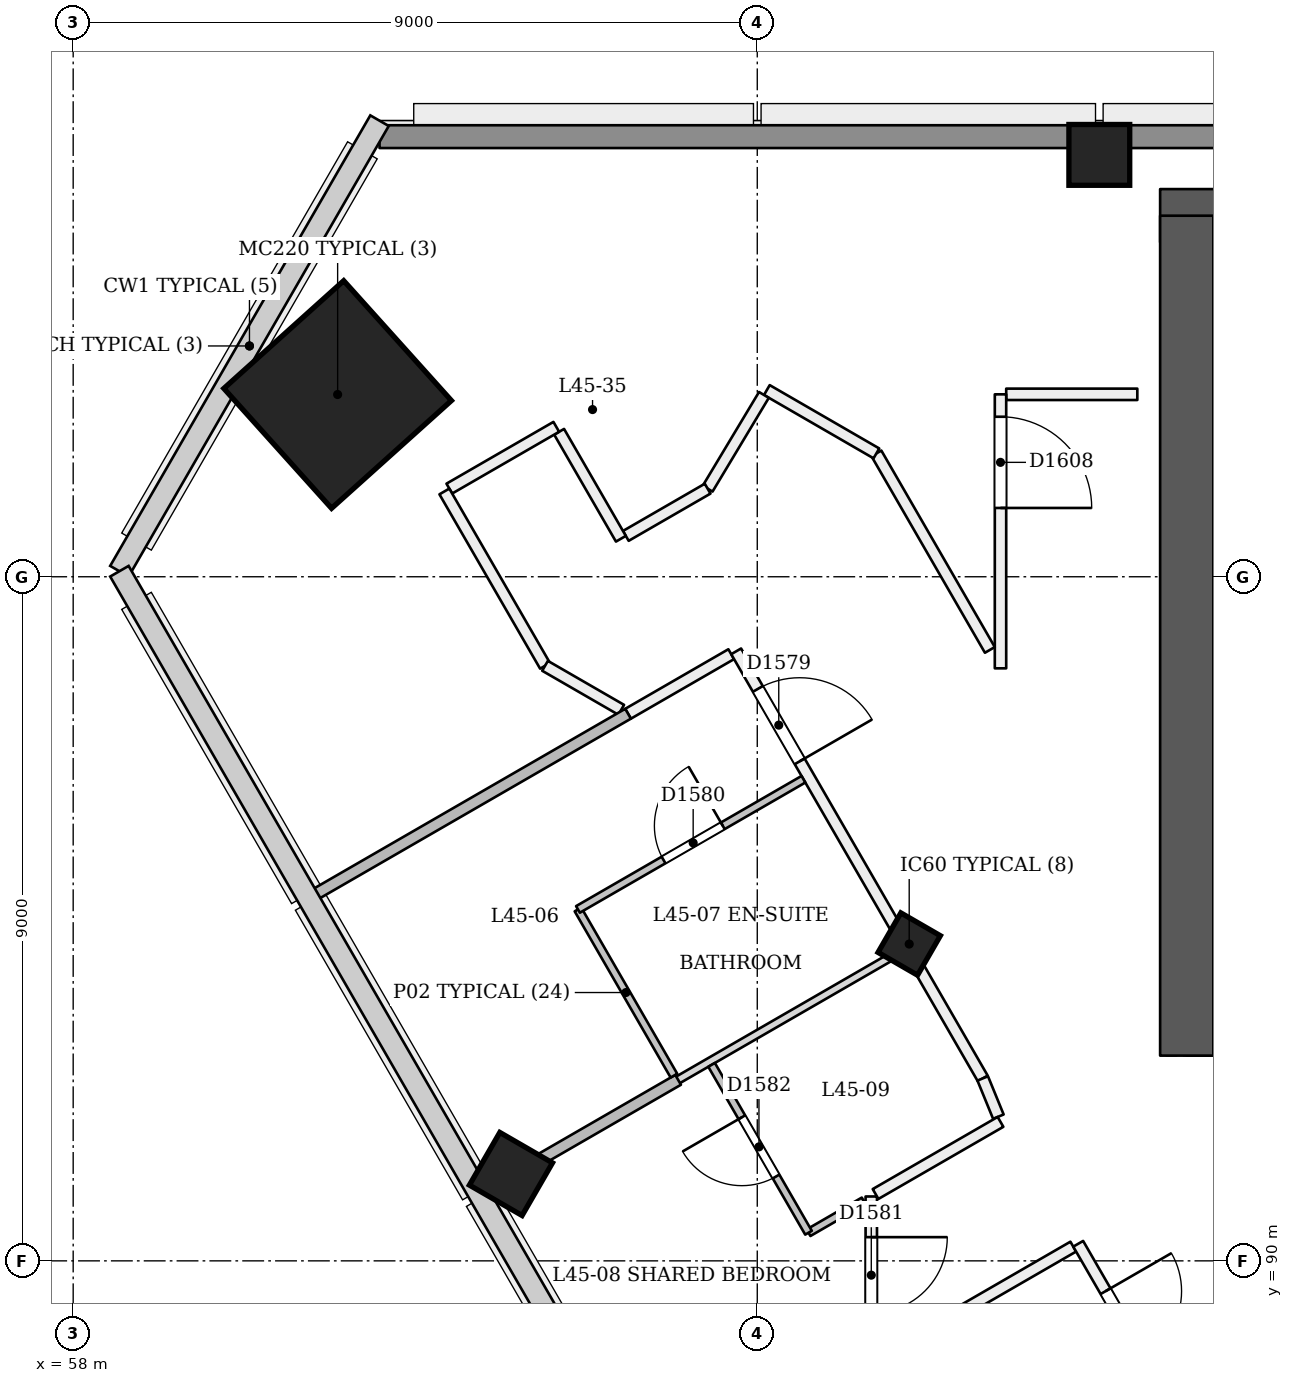
"""IFC4 building model, lengths in metres.
Left out: names, types, materials, properties, quantities, classifications, styles, units other than length and angle.
Written with IfcOpenShell. Run it as: python <this file> out.ifc"""

import sys

from ifc_helpers import new_model, si_unit, direction, frame, frame_2d, origin, origin_2d, place, context, subcontext, project, spatial, rectangle, extrude, element, fill, save


model = new_model("IFC4")
c1 = context("Model", 3, precision=1e-05, world=origin(), true_north=direction((0.0, 1.0)))
c2 = subcontext(c1, "Body", "Model", "MODEL_VIEW")
j1 = project(units=[si_unit("LENGTHUNIT", "METRE"), si_unit("PLANEANGLEUNIT", "RADIAN")], contexts=[c1])
p1 = place(None, origin())
s1 = spatial("IfcSite", under=j1, at=p1, CompositionType="ELEMENT")
p2 = place(p1, origin())
s2 = spatial("IfcBuilding", under=s1, at=p2, CompositionType="ELEMENT")
p3 = place(p2, frame((0.0, 0.0, 174.6)))
s3 = spatial("IfcBuildingStorey", under=s2, at=p3, CompositionType="ELEMENT", Elevation=174.6)
p4 = place(p3, frame((72.65, 93.05, 0.0), z_axis=(0.0, 0.0, 1.0), x_axis=(1.0, 0.0, 0.0)))
e1 = element("IfcWall", 1, at=p4, inside=s3, PredefinedType="SHEAR", context=c2, shape_type="SweptSolid", body=[
    extrude(rectangle(XDim=25.05, YDim=0.7, at=frame_2d((12.525, 0.0))), origin(), (0.0, 0.0, 1.0), 3.6),
])
p5 = place(p4, frame((1.15, 0.0, 0.0)))
e2 = element("IfcOpeningElement", 2, at=p5, cuts=e1, PredefinedType="OPENING", context=c2, shape_type="SweptSolid", body=[
    extrude(rectangle(XDim=1.2, YDim=2.1, at=frame_2d((0.6, 1.05))), frame((0.0, 0.36, 0.0), z_axis=(0.0, -1.0, 0.0), x_axis=(1.0, 0.0, 0.0)), (0.0, 0.0, 1.0), 0.721),
])
p6 = place(p4, frame((3.35, 0.0, 0.0)))
e3 = element("IfcOpeningElement", 3, at=p6, cuts=e1, PredefinedType="OPENING", context=c2, shape_type="SweptSolid", body=[
    extrude(rectangle(XDim=1.2, YDim=2.1, at=frame_2d((0.6, 1.05))), frame((0.0, 0.36, 0.0), z_axis=(0.0, -1.0, 0.0), x_axis=(1.0, 0.0, 0.0)), (0.0, 0.0, 1.0), 0.721),
])
p7 = place(p4, frame((13.35, 0.0, 0.0)))
e4 = element("IfcOpeningElement", 4, at=p7, cuts=e1, PredefinedType="OPENING", context=c2, shape_type="SweptSolid", body=[
    extrude(rectangle(XDim=1.2, YDim=2.1, at=frame_2d((0.6, 1.05))), frame((0.0, 0.36, 0.0), z_axis=(0.0, -1.0, 0.0), x_axis=(1.0, 0.0, 0.0)), (0.0, 0.0, 1.0), 0.721),
])
p8 = place(p4, frame((15.312, 0.0, 0.0)))
e5 = element("IfcOpeningElement", 5, at=p8, cuts=e1, PredefinedType="OPENING", context=c2, shape_type="SweptSolid", body=[
    extrude(rectangle(XDim=1.0, YDim=2.1, at=frame_2d((0.5, 1.05))), frame((0.0, 0.36, 0.0), z_axis=(0.0, -1.0, 0.0), x_axis=(1.0, 0.0, 0.0)), (0.0, 0.0, 1.0), 0.721),
])
p9 = place(p4, frame((18.15, 0.0, 0.0)))
e6 = element("IfcOpeningElement", 6, at=p9, cuts=e1, PredefinedType="OPENING", context=c2, shape_type="SweptSolid", body=[
    extrude(rectangle(XDim=1.0, YDim=2.1, at=frame_2d((0.5, 1.05))), frame((0.0, 0.36, 0.0), z_axis=(0.0, -1.0, 0.0), x_axis=(1.0, 0.0, 0.0)), (0.0, 0.0, 1.0), 0.721),
])
p10 = place(p4, frame((21.05, 0.0, 0.0)))
e7 = element("IfcOpeningElement", 7, at=p10, cuts=e1, PredefinedType="OPENING", context=c2, shape_type="SweptSolid", body=[
    extrude(rectangle(XDim=1.0, YDim=2.1, at=frame_2d((0.5, 1.05))), frame((0.0, 0.36, 0.0), z_axis=(0.0, -1.0, 0.0), x_axis=(1.0, 0.0, 0.0)), (0.0, 0.0, 1.0), 0.721),
])
p11 = place(p4, frame((22.938, 0.0, 0.0)))
e8 = element("IfcOpeningElement", 8, at=p11, cuts=e1, PredefinedType="OPENING", context=c2, shape_type="SweptSolid", body=[
    extrude(rectangle(XDim=1.0, YDim=2.1, at=frame_2d((0.5, 1.05))), frame((0.0, 0.36, 0.0), z_axis=(0.0, -1.0, 0.0), x_axis=(1.0, 0.0, 0.0)), (0.0, 0.0, 1.0), 0.721),
])
p12 = place(p3, frame((97.35, 103.75, 0.0), z_axis=(0.0, 0.0, 1.0), x_axis=(-1.0, 0.0, 0.0)))
e9 = element("IfcWall", 9, at=p12, inside=s3, PredefinedType="SHEAR", context=c2, shape_type="SweptSolid", body=[
    extrude(rectangle(XDim=25.05, YDim=0.7, at=frame_2d((12.525, 0.0))), origin(), (0.0, 0.0, 1.0), 3.6),
])
p13 = place(p3, frame((72.65, 103.75, 0.0), z_axis=(0.0, 0.0, 1.0), x_axis=(0.0, -1.0, 0.0)))
e10 = element("IfcWall", 10, at=p13, inside=s3, PredefinedType="SHEAR", context=c2, shape_type="SweptSolid", body=[
    extrude(rectangle(XDim=11.05, YDim=0.7, at=frame_2d((5.525, 0.0))), origin(), (0.0, 0.0, 1.0), 3.6),
])
p14 = place(p3, frame((68.972, 94.121, -0.018), z_axis=(0.022221406801, 0.038413224561, 0.999014831351), x_axis=(-0.866025617206, -0.498520426688, 0.038431946587)))
e11 = element("IfcColumn", 11, at=p14, inside=s3, PredefinedType="COLUMN", context=c2, shape_type="SweptSolid", body=[
    extrude(rectangle(XDim=0.6, YDim=0.6, at=origin_2d()), origin(), (0.0, 0.0, 1.0), 3.604),
])
p15 = place(p3, frame((61.445, 101.386, 0.0), z_axis=(0.028403739082, 0.009219352065, 0.999554016126), x_axis=(-0.865118529183, 0.501170118188, 0.019961039515)))
e12 = element("IfcColumn", 12, at=p15, inside=s3, PredefinedType="COLUMN", context=c2, shape_type="SweptSolid", body=[
    extrude(rectangle(XDim=2.12, YDim=2.12, at=origin_2d()), origin(), (0.0, 0.0, 1.0), 3.602),
])
p16 = place(p3, frame((71.5, 104.55, 0.0), z_axis=(0.0, 0.0, 1.0), x_axis=(1.0, 0.0, 0.0)))
e13 = element("IfcColumn", 13, at=p16, inside=s3, PredefinedType="COLUMN", context=c2, shape_type="SweptSolid", body=[
    extrude(rectangle(XDim=0.8, YDim=0.8, at=origin_2d()), origin(), (0.0, 0.0, 1.0), 3.6),
])
p17 = place(p3, frame((63.732, 91.096, -0.024), z_axis=(0.02222134892, 0.038480872521, 0.999012229206), x_axis=(-0.865643643917, -0.499179494629, 0.038482643982)))
e14 = element("IfcColumn", 14, at=p17, inside=s3, PredefinedType="COLUMN", context=c2, shape_type="SweptSolid", body=[
    extrude(rectangle(XDim=0.8, YDim=0.8, at=origin_2d()), origin(), (0.0, 0.0, 1.0), 3.604),
])
p18 = place(p3, frame((65.3, 97.198, 0.0), z_axis=(0.0, 0.0, 1.0), x_axis=(0.86599100931, 0.500059568247, 0.0)))
e15 = element("IfcWall", 15, at=p18, inside=s3, PredefinedType="PARTITIONING", context=c2, shape_type="SweptSolid", body=[
    extrude(rectangle(XDim=1.567, YDim=0.15, at=frame_2d((0.784, 0.0))), origin(), (0.0, 0.0, 1.0), 3.15),
])
p19 = place(p3, frame((66.722, 98.019, 0.0), z_axis=(0.0, 0.0, 1.0), x_axis=(0.500008002287, -0.866020783612, 0.0)))
e16 = element("IfcWall", 16, at=p19, inside=s3, PredefinedType="PARTITIONING", context=c2, shape_type="SweptSolid", body=[
    extrude(rectangle(XDim=6.488, YDim=0.15, at=frame_2d((3.244, 0.0))), origin(), (0.0, 0.0, 1.0), 2.75),
])
p20 = place(p19, frame((0.571, 0.0, 0.0)))
e17 = element("IfcOpeningElement", 17, at=p20, cuts=e16, PredefinedType="OPENING", context=c2, shape_type="SweptSolid", body=[
    extrude(rectangle(XDim=1.1, YDim=2.1, at=frame_2d((0.55, 1.05))), frame((0.0, 0.085, 0.0), z_axis=(0.0, -1.0, 0.0), x_axis=(1.0, 0.0, 0.0)), (0.0, 0.0, 1.0), 0.171),
])
p21 = place(p3, frame((68.5, 90.847, 0.0), z_axis=(0.0, 0.0, 1.0), x_axis=(0.0, -1.0, 0.0)))
e18 = element("IfcWall", 18, at=p21, inside=s3, PredefinedType="PARTITIONING", context=c2, shape_type="SweptSolid", body=[
    extrude(rectangle(XDim=2.064, YDim=0.15, at=frame_2d((1.032, 0.0))), origin(), (0.0, 0.0, 1.0), 3.15),
])
p22 = place(p21, frame((0.535, 0.0, 0.0)))
e19 = element("IfcOpeningElement", 19, at=p22, cuts=e18, PredefinedType="OPENING", context=c2, shape_type="SweptSolid", body=[
    extrude(rectangle(XDim=1.0, YDim=2.1, at=frame_2d((0.5, 1.05))), frame((0.0, 0.085, 0.0), z_axis=(0.0, -1.0, 0.0), x_axis=(1.0, 0.0, 0.0)), (0.0, 0.0, 1.0), 0.171),
])
p23 = place(p3, frame((69.966, 92.4, 0.0), z_axis=(0.0, 0.0, 1.0), x_axis=(0.378510313682, -0.925597073481, 0.0)))
e20 = element("IfcWall", 20, at=p23, inside=s3, PredefinedType="PARTITIONING", context=c2, shape_type="SweptSolid", body=[
    extrude(rectangle(XDim=0.543, YDim=0.15, at=frame_2d((0.271, 0.0))), origin(), (0.0, 0.0, 1.0), 3.15),
])
p24 = place(p3, frame((70.2, 91.828, 0.0), z_axis=(0.0, 0.0, 1.0), x_axis=(-0.866042076863, -0.499971120268, 0.0)))
e21 = element("IfcWall", 21, at=p24, inside=s3, PredefinedType="PARTITIONING", context=c2, shape_type="SweptSolid", body=[
    extrude(rectangle(XDim=1.898, YDim=0.15, at=frame_2d((0.949, 0.0))), origin(), (0.0, 0.0, 1.0), 3.15),
])
p25 = place(p3, frame((68.52, 88.665, 0.0), z_axis=(0.0, 0.0, 1.0), x_axis=(0.866044067064, 0.499967672858, 0.0)))
e22 = element("IfcWall", 22, at=p25, inside=s3, PredefinedType="PARTITIONING", context=c2, shape_type="SweptSolid", body=[
    extrude(rectangle(XDim=3.045, YDim=0.15, at=frame_2d((1.522, 0.0))), origin(), (0.0, 0.0, 1.0), 3.15),
])
p26 = place(p3, frame((71.222, 90.225, 0.0), z_axis=(0.0, 0.0, 1.0), x_axis=(0.500002130291, -0.866024173857, 0.0)))
e23 = element("IfcWall", 23, at=p26, inside=s3, PredefinedType="PARTITIONING", context=c2, shape_type="SweptSolid", body=[
    extrude(rectangle(XDim=27.556, YDim=0.15, at=frame_2d((13.778, 0.0))), origin(), (0.0, 0.0, 1.0), 2.75),
])
p27 = place(p26, frame((0.72, 0.0, 0.0)))
e24 = element("IfcOpeningElement", 24, at=p27, cuts=e23, PredefinedType="OPENING", context=c2, shape_type="SweptSolid", body=[
    extrude(rectangle(XDim=1.0, YDim=2.1, at=frame_2d((0.5, 1.05))), frame((0.0, 0.085, 0.0), z_axis=(0.0, -1.0, 0.0), x_axis=(1.0, 0.0, 0.0)), (0.0, 0.0, 1.0), 0.171),
])
p28 = place(p26, frame((7.395, 0.0, 0.0)))
e25 = element("IfcOpeningElement", 25, at=p28, cuts=e23, PredefinedType="OPENING", context=c2, shape_type="SweptSolid", body=[
    extrude(rectangle(XDim=1.0, YDim=2.1, at=frame_2d((0.5, 1.05))), frame((0.0, 0.085, 0.0), z_axis=(0.0, -1.0, 0.0), x_axis=(1.0, 0.0, 0.0)), (0.0, 0.0, 1.0), 0.171),
])
p29 = place(p26, frame((9.72, 0.0, 0.0)))
e26 = element("IfcOpeningElement", 26, at=p29, cuts=e23, PredefinedType="OPENING", context=c2, shape_type="SweptSolid", body=[
    extrude(rectangle(XDim=1.0, YDim=2.1, at=frame_2d((0.5, 1.05))), frame((0.0, 0.085, 0.0), z_axis=(0.0, -1.0, 0.0), x_axis=(1.0, 0.0, 0.0)), (0.0, 0.0, 1.0), 0.171),
])
p30 = place(p26, frame((16.28, 0.0, 0.0)))
e27 = element("IfcOpeningElement", 27, at=p30, cuts=e23, PredefinedType="OPENING", context=c2, shape_type="SweptSolid", body=[
    extrude(rectangle(XDim=1.0, YDim=2.1, at=frame_2d((0.5, 1.05))), frame((0.0, 0.085, 0.0), z_axis=(0.0, -1.0, 0.0), x_axis=(1.0, 0.0, 0.0)), (0.0, 0.0, 1.0), 0.171),
])
p31 = place(p26, frame((18.72, 0.0, 0.0)))
e28 = element("IfcOpeningElement", 28, at=p31, cuts=e23, PredefinedType="OPENING", context=c2, shape_type="SweptSolid", body=[
    extrude(rectangle(XDim=1.0, YDim=2.1, at=frame_2d((0.5, 1.05))), frame((0.0, 0.085, 0.0), z_axis=(0.0, -1.0, 0.0), x_axis=(1.0, 0.0, 0.0)), (0.0, 0.0, 1.0), 0.171),
])
p32 = place(p26, frame((25.697, 0.0, 0.0)))
e29 = element("IfcOpeningElement", 29, at=p32, cuts=e23, PredefinedType="OPENING", context=c2, shape_type="SweptSolid", body=[
    extrude(rectangle(XDim=1.2, YDim=2.1, at=frame_2d((0.6, 1.05))), frame((0.0, 0.085, 0.0), z_axis=(0.0, -1.0, 0.0), x_axis=(1.0, 0.0, 0.0)), (0.0, 0.0, 1.0), 0.171),
])
p33 = place(p3, frame((72.0, 101.4, 0.0), z_axis=(0.0, 0.0, 1.0), x_axis=(-1.0, 0.0, 0.0)))
e30 = element("IfcWall", 30, at=p33, inside=s3, PredefinedType="PARTITIONING", context=c2, shape_type="SweptSolid", body=[
    extrude(rectangle(XDim=1.725, YDim=0.15, at=frame_2d((0.863, 0.0))), origin(), (0.0, 0.0, 1.0), 3.15),
])
p34 = place(p3, frame((70.2, 101.4, 0.0), z_axis=(0.0, 0.0, 1.0), x_axis=(0.0, -1.0, 0.0)))
e31 = element("IfcWall", 31, at=p34, inside=s3, PredefinedType="PARTITIONING", context=c2, shape_type="SweptSolid", body=[
    extrude(rectangle(XDim=3.605, YDim=0.15, at=frame_2d((1.802, 0.0))), origin(), (0.0, 0.0, 1.0), 3.15),
])
p35 = place(p34, frame((0.295, 0.0, 0.0)))
e32 = element("IfcOpeningElement", 32, at=p35, cuts=e31, PredefinedType="OPENING", context=c2, shape_type="SweptSolid", body=[
    extrude(rectangle(XDim=1.2, YDim=2.1, at=frame_2d((0.6, 1.05))), frame((0.0, 0.085, 0.0), z_axis=(0.0, -1.0, 0.0), x_axis=(1.0, 0.0, 0.0)), (0.0, 0.0, 1.0), 0.171),
])
p36 = place(p3, frame((70.06, 98.038, 0.0), z_axis=(0.0, 0.0, 1.0), x_axis=(-0.499991453095, 0.866030338286, 0.0)))
e33 = element("IfcWall", 33, at=p36, inside=s3, PredefinedType="PARTITIONING", context=c2, shape_type="SweptSolid", body=[
    extrude(rectangle(XDim=2.985, YDim=0.15, at=frame_2d((1.493, 0.0))), origin(), (0.0, 0.0, 1.0), 3.15),
])
p37 = place(p3, frame((68.567, 100.623, 0.0), z_axis=(0.0, 0.0, 1.0), x_axis=(-0.865750715343, 0.500475472809, 0.0)))
e34 = element("IfcWall", 34, at=p37, inside=s3, PredefinedType="PARTITIONING", context=c2, shape_type="SweptSolid", body=[
    extrude(rectangle(XDim=1.665, YDim=0.15, at=frame_2d((0.833, 0.0))), origin(), (0.0, 0.0, 1.0), 3.15),
])
p38 = place(p3, frame((67.087, 101.392, 0.0), z_axis=(0.0, 0.0, 1.0), x_axis=(-0.51479524999, -0.85731315783, 0.0)))
e35 = element("IfcWall", 35, at=p38, inside=s3, PredefinedType="PARTITIONING", context=c2, shape_type="SweptSolid", body=[
    extrude(rectangle(XDim=1.438, YDim=0.15, at=frame_2d((0.719, 0.0))), origin(), (0.0, 0.0, 1.0), 3.15),
])
p39 = place(p3, frame((66.347, 100.159, 0.0), z_axis=(0.0, 0.0, 1.0), x_axis=(-0.866021999733, -0.500005895944, 0.0)))
e36 = element("IfcWall", 36, at=p39, inside=s3, PredefinedType="PARTITIONING", context=c2, shape_type="SweptSolid", body=[
    extrude(rectangle(XDim=1.243, YDim=0.15, at=frame_2d((0.621, 0.0))), origin(), (0.0, 0.0, 1.0), 3.15),
])
for number, where, z_axis, x_axis in (
    (37, (65.206, 99.5, 0.0), (0.0, 0.0, 1.0), (-0.5, 0.866, 0.0)),
    (38, (64.356, 100.972, 0.0), (0.0, 0.0, 1.0), (-0.866, -0.5, 0.0)),
):
    element("IfcWall", number, at=place(p3, frame(where, z_axis=z_axis, x_axis=x_axis)), inside=s3, PredefinedType="PARTITIONING", context=c2, shape_type="SweptSolid", body=[
        extrude(rectangle(XDim=1.625, YDim=0.15, at=frame_2d((0.812, 0.0))), origin(), (0.0, 0.0, 1.0), 3.15),
    ])
p40 = place(p3, frame((62.884, 100.122, 0.0), z_axis=(0.0, 0.0, 1.0), x_axis=(0.499975083092, -0.86603978909, 0.0)))
e39 = element("IfcWall", 39, at=p40, inside=s3, PredefinedType="PARTITIONING", context=c2, shape_type="SweptSolid", body=[
    extrude(rectangle(XDim=2.649, YDim=0.15, at=frame_2d((1.325, 0.0))), origin(), (0.0, 0.0, 1.0), 3.15),
])
p41 = place(p3, frame((64.208, 97.828, 0.0), z_axis=(0.0, 0.0, 1.0), x_axis=(0.866066110499, -0.499929487274, 0.0)))
e40 = element("IfcWall", 40, at=p41, inside=s3, PredefinedType="PARTITIONING", context=c2, shape_type="SweptSolid", body=[
    extrude(rectangle(XDim=1.157, YDim=0.15, at=frame_2d((0.579, 0.0))), origin(), (0.0, 0.0, 1.0), 3.15),
])
p42 = place(p3, frame((65.904, 92.437, 0.0), z_axis=(0.0, 0.0, 1.0), x_axis=(-0.50001820224, 0.866014894461, 0.0)))
e41 = element("IfcWall", 41, at=p42, inside=s3, PredefinedType="PARTITIONING", context=c2, shape_type="SweptSolid", body=[
    extrude(rectangle(XDim=2.525, YDim=0.1, at=frame_2d((1.262, 0.0))), origin(), (0.0, 0.0, 1.0), 2.75),
])
p43 = place(p3, frame((64.641, 94.623, 0.0), z_axis=(0.0, 0.0, 1.0), x_axis=(0.866001587311, 0.500041249073, 0.0)))
e42 = element("IfcWall", 42, at=p43, inside=s3, PredefinedType="PARTITIONING", context=c2, shape_type="SweptSolid", body=[
    extrude(rectangle(XDim=3.425, YDim=0.1, at=frame_2d((1.712, 0.0))), origin(), (0.0, 0.0, 1.0), 3.15),
])
p44 = place(p43, frame((1.3, 0.0, 0.0)))
e43 = element("IfcOpeningElement", 43, at=p44, cuts=e42, PredefinedType="OPENING", context=c2, shape_type="SweptSolid", body=[
    extrude(rectangle(XDim=0.9, YDim=2.1, at=frame_2d((0.45, 1.05))), frame((0.0, 0.061, 0.0), z_axis=(0.0, -1.0, 0.0), x_axis=(1.0, 0.0, 0.0)), (0.0, 0.0, 1.0), 0.121),
])
p45 = place(p3, frame((63.43, 90.922, 0.0), z_axis=(0.0, 0.0, 1.0), x_axis=(0.865996226145, 0.500050533749, 0.0)))
e44 = element("IfcWall", 44, at=p45, inside=s3, PredefinedType="PARTITIONING", context=c2, shape_type="SweptSolid", body=[
    extrude(rectangle(XDim=2.92, YDim=0.15, at=frame_2d((1.46, 0.0))), origin(), (0.0, 0.0, 1.0), 2.65),
])
p46 = place(p3, frame((65.3, 97.198, 0.0), z_axis=(0.0, 0.0, 1.0), x_axis=(-0.866036681201, -0.499980466432, 0.0)))
e45 = element("IfcWall", 45, at=p46, inside=s3, PredefinedType="PARTITIONING", context=c2, shape_type="SweptSolid", body=[
    extrude(rectangle(XDim=4.778, YDim=0.15, at=frame_2d((2.389, 0.0))), origin(), (0.0, 0.0, 1.0), 2.65),
])
p47 = place(p3, frame((65.924, 92.362, 0.0), z_axis=(0.0, 0.0, 1.0), x_axis=(0.866032163869, 0.499988291006, 0.0)))
e46 = element("IfcWall", 46, at=p47, inside=s3, PredefinedType="PARTITIONING", context=c2, shape_type="SweptSolid", body=[
    extrude(rectangle(XDim=3.445, YDim=0.1, at=frame_2d((1.722, 0.0))), origin(), (0.0, 0.0, 1.0), 2.75),
])
p48 = place(p3, frame((68.4, 90.789, 0.0), z_axis=(0.0, 0.0, 1.0), x_axis=(-0.866083720475, -0.499898978922, 0.0)))
e47 = element("IfcWall", 47, at=p48, inside=s3, PredefinedType="PARTITIONING", context=c2, shape_type="SweptSolid", body=[
    extrude(rectangle(XDim=0.838, YDim=0.1, at=frame_2d((0.419, 0.0))), origin(), (0.0, 0.0, 1.0), 3.15),
])
p49 = place(p3, frame((67.674, 90.37, 0.0), z_axis=(0.0, 0.0, 1.0), x_axis=(-0.499990435942, 0.866030925526, 0.0)))
e48 = element("IfcWall", 48, at=p49, inside=s3, PredefinedType="PARTITIONING", context=c2, shape_type="SweptSolid", body=[
    extrude(rectangle(XDim=2.55, YDim=0.1, at=frame_2d((1.275, 0.0))), origin(), (0.0, 0.0, 1.0), 2.75),
])
p50 = place(p49, frame((0.854, 0.0, 0.0)))
e49 = element("IfcOpeningElement", 49, at=p50, cuts=e48, PredefinedType="OPENING", context=c2, shape_type="SweptSolid", body=[
    extrude(rectangle(XDim=0.9, YDim=2.1, at=frame_2d((0.45, 1.05))), frame((0.0, 0.061, 0.0), z_axis=(0.0, -1.0, 0.0), x_axis=(1.0, 0.0, 0.0)), (0.0, 0.0, 1.0), 0.121),
])
p51 = place(p3, frame((62.03, 104.79, 0.0), z_axis=(0.0, 0.0, 1.0), x_axis=(1.0, 0.0, 0.0)))
e50 = element("IfcWall", 50, at=p51, inside=s3, PredefinedType="SOLIDWALL", context=c2, shape_type="SweptSolid", body=[
    extrude(rectangle(XDim=45.939, YDim=0.3, at=frame_2d((22.97, 0.0))), origin(), (0.0, 0.0, 1.0), 2.65),
])
p52 = place(p20, origin())
e51 = element("IfcDoor", 51, at=p52, inside=s3, OperationType="SINGLE_SWING_RIGHT", PredefinedType="NOTDEFINED", context=c2, shape_type="SweptSolid", body=[
    extrude(rectangle(XDim=1.1, YDim=2.1, at=frame_2d((0.55, 1.05))), frame((0.0, 0.025, 0.0), z_axis=(0.0, -1.0, 0.0), x_axis=(1.0, 0.0, 0.0)), (0.0, 0.0, 1.0), 0.05),
])
fill(e17, e51)
p53 = place(p44, origin())
e52 = element("IfcDoor", 52, at=p53, inside=s3, OperationType="SINGLE_SWING_RIGHT", PredefinedType="NOTDEFINED", context=c2, shape_type="SweptSolid", body=[
    extrude(rectangle(XDim=0.9, YDim=2.1, at=frame_2d((0.45, 1.05))), frame((0.0, 0.025, 0.0), z_axis=(0.0, -1.0, 0.0), x_axis=(1.0, 0.0, 0.0)), (0.0, 0.0, 1.0), 0.05),
])
fill(e43, e52)
p54 = place(p22, origin())
e53 = element("IfcDoor", 53, at=p54, inside=s3, OperationType="SINGLE_SWING_LEFT", PredefinedType="NOTDEFINED", context=c2, shape_type="SweptSolid", body=[
    extrude(rectangle(XDim=1.0, YDim=2.1, at=frame_2d((0.5, 1.05))), frame((0.0, 0.025, 0.0), z_axis=(0.0, -1.0, 0.0), x_axis=(1.0, 0.0, 0.0)), (0.0, 0.0, 1.0), 0.05),
])
fill(e19, e53)
p55 = place(p50, origin())
e54 = element("IfcDoor", 54, at=p55, inside=s3, OperationType="SINGLE_SWING_RIGHT", PredefinedType="NOTDEFINED", context=c2, shape_type="SweptSolid", body=[
    extrude(rectangle(XDim=0.9, YDim=2.1, at=frame_2d((0.45, 1.05))), frame((0.0, 0.025, 0.0), z_axis=(0.0, -1.0, 0.0), x_axis=(1.0, 0.0, 0.0)), (0.0, 0.0, 1.0), 0.05),
])
fill(e49, e54)
p56 = place(p27, origin())
e55 = element("IfcDoor", 55, at=p56, inside=s3, OperationType="SINGLE_SWING_LEFT", PredefinedType="NOTDEFINED", context=c2, shape_type="SweptSolid", body=[
    extrude(rectangle(XDim=1.0, YDim=2.1, at=frame_2d((0.5, 1.05))), frame((0.0, 0.025, 0.0), z_axis=(0.0, -1.0, 0.0), x_axis=(1.0, 0.0, 0.0)), (0.0, 0.0, 1.0), 0.05),
])
fill(e24, e55)
p57 = place(p35, origin())
e56 = element("IfcDoor", 56, at=p57, inside=s3, OperationType="SINGLE_SWING_RIGHT", PredefinedType="NOTDEFINED", context=c2, shape_type="SweptSolid", body=[
    extrude(rectangle(XDim=1.2, YDim=2.1, at=frame_2d((0.6, 1.05))), frame((0.0, 0.025, 0.0), z_axis=(0.0, -1.0, 0.0), x_axis=(1.0, 0.0, 0.0)), (0.0, 0.0, 1.0), 0.05),
])
fill(e32, e56)
save(model, sys.argv[1])
